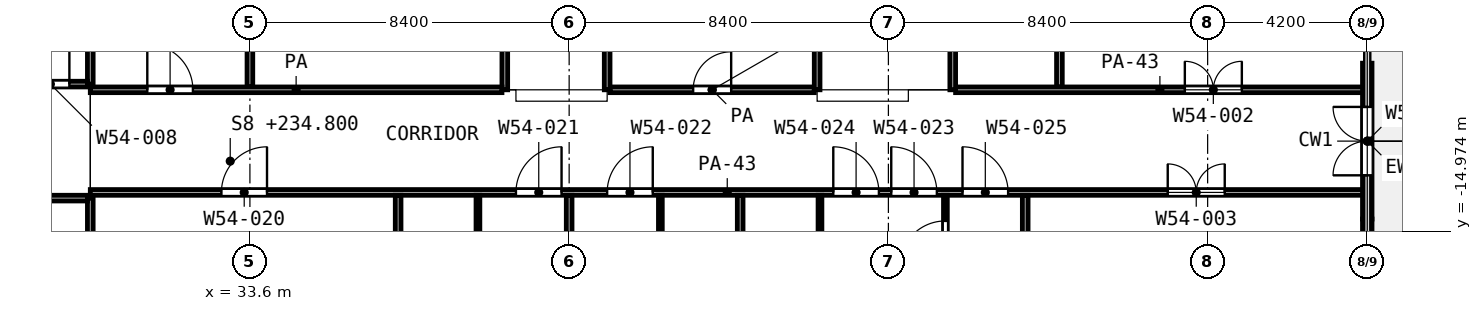
"""IFC4 building model, lengths in metres.
Left out: names, types, materials, properties, quantities, classifications, styles, units other than length and angle.
Written with IfcOpenShell. Run it as: python <this file> out.ifc"""

import sys

from ifc_helpers import new_model, si_unit, direction, frame, frame_2d, origin, place, context, subcontext, project, spatial, rectangle, extrude, element, fill, save


model = new_model("IFC4")
c1 = context("Model", 3, precision=1e-05, world=origin(), true_north=direction((0.0, 1.0)))
c2 = subcontext(c1, "Body", "Model", "MODEL_VIEW")
j1 = project(units=[si_unit("LENGTHUNIT", "METRE"), si_unit("PLANEANGLEUNIT", "RADIAN")], contexts=[c1])
p1 = place(None, origin())
s1 = spatial("IfcSite", under=j1, at=p1, CompositionType="ELEMENT")
p2 = place(p1, origin())
s2 = spatial("IfcBuilding", under=s1, at=p2, CompositionType="ELEMENT")
p3 = place(p2, frame((0.0, 0.0, 234.8)))
s3 = spatial("IfcBuildingStorey", under=s2, at=p3, CompositionType="ELEMENT", Elevation=234.8)
p4 = place(p3, frame((63.0, -18.75, 0.0), z_axis=(0.0, 0.0, 1.0), x_axis=(0.0, 1.0, 0.0)))
e1 = element("IfcWall", 1, at=p4, inside=s3, PredefinedType="SOLIDWALL", context=c2, shape_type="SweptSolid", body=[
    extrude(rectangle(XDim=4.1, YDim=0.25, at=frame_2d((2.05, 0.0))), origin(), (0.0, 0.0, 1.0), 2.58),
])
p5 = place(p4, frame((1.15, 0.0, 0.0)))
e2 = element("IfcOpeningElement", 2, at=p5, cuts=e1, PredefinedType="OPENING", context=c2, shape_type="SweptSolid", body=[
    extrude(rectangle(XDim=1.8, YDim=2.1, at=frame_2d((0.9, 1.05))), frame((0.0, 0.135, 0.0), z_axis=(0.0, -1.0, 0.0), x_axis=(1.0, 0.0, 0.0)), (0.0, 0.0, 1.0), 0.27),
])
p6 = place(p3, frame((63.0, -14.65, 0.0), z_axis=(0.0, 0.0, 1.0), x_axis=(0.0, 1.0, 0.0)))
e3 = element("IfcWall", 3, at=p6, inside=s3, PredefinedType="SOLIDWALL", context=c2, shape_type="SweptSolid", body=[
    extrude(rectangle(XDim=4.1, YDim=0.25, at=frame_2d((2.05, 0.0))), origin(), (0.0, 0.0, 1.0), 2.58),
])
p7 = place(p6, frame((1.15, 0.0, 0.0)))
e4 = element("IfcOpeningElement", 4, at=p7, cuts=e3, PredefinedType="OPENING", context=c2, shape_type="SweptSolid", body=[
    extrude(rectangle(XDim=1.8, YDim=2.1, at=frame_2d((0.9, 1.05))), frame((0.0, 0.135, 0.0), z_axis=(0.0, -1.0, 0.0), x_axis=(1.0, 0.0, 0.0)), (0.0, 0.0, 1.0), 0.27),
])
for number, where, z_axis, x_axis in (
    (5, (39.6, -16.65, 0.0), (0.0, 0.0, 1.0), (0.0, 1.0, 0.0)),
    (6, (44.4, -16.65, 0.0), (0.0, 0.0, 1.0), (0.0, 1.0, 0.0)),
    (7, (48.6, -16.65, 0.0), (0.0, 0.0, 1.0), (0.0, 1.0, 0.0)),
):
    element("IfcWall", number, at=place(p3, frame(where, z_axis=z_axis, x_axis=x_axis)), inside=s3, PredefinedType="PARTITIONING", context=c2, shape_type="SweptSolid", body=[
        extrude(rectangle(XDim=2.625, YDim=0.1, at=frame_2d((1.312, 0.0))), origin(), (0.0, 0.0, 1.0), 3.6),
    ])
p8 = place(p3, frame((51.9, -16.65, 0.0), z_axis=(0.0, 0.0, 1.0), x_axis=(0.0, 1.0, 0.0)))
e8 = element("IfcWall", 8, at=p8, inside=s3, PredefinedType="PARTITIONING", context=c2, shape_type="SweptSolid", body=[
    extrude(rectangle(XDim=2.625, YDim=0.1, at=frame_2d((1.312, 0.0))), origin(), (0.0, 0.0, 1.0), 3.6),
])
p9 = place(p8, frame((0.75, 0.0, 0.0)))
e9 = element("IfcOpeningElement", 9, at=p9, cuts=e8, PredefinedType="OPENING", context=c2, shape_type="SweptSolid", body=[
    extrude(rectangle(XDim=1.2, YDim=2.1, at=frame_2d((0.6, 1.05))), frame((0.0, 0.06, 0.0), z_axis=(0.0, -1.0, 0.0), x_axis=(1.0, 0.0, 0.0)), (0.0, 0.0, 1.0), 0.12),
])
p10 = place(p3, frame((24.8, -14.1, 0.0), z_axis=(0.0, 0.0, 1.0), x_axis=(1.0, 0.0, 0.0)))
e10 = element("IfcWall", 10, at=p10, inside=s3, PredefinedType="PARTITIONING", context=c2, shape_type="SweptSolid", body=[
    extrude(rectangle(XDim=4.525, YDim=0.15, at=frame_2d((2.262, 0.0))), origin(), (0.0, 0.0, 1.0), 3.6),
])
p11 = place(p10, frame((1.75, 0.0, 0.0)))
e11 = element("IfcOpeningElement", 11, at=p11, cuts=e10, PredefinedType="OPENING", context=c2, shape_type="SweptSolid", body=[
    extrude(rectangle(XDim=1.5, YDim=2.1, at=frame_2d((0.75, 1.05))), frame((0.0, 0.085, 0.0), z_axis=(0.0, -1.0, 0.0), x_axis=(1.0, 0.0, 0.0)), (0.0, 0.0, 1.0), 0.17),
])
p12 = place(p3, frame((29.4, -13.95, 0.0), z_axis=(0.0, 0.0, 1.0), x_axis=(1.0, 0.0, 0.0)))
e12 = element("IfcWall", 12, at=p12, inside=s3, PredefinedType="PARTITIONING", context=c2, shape_type="SweptSolid", body=[
    extrude(rectangle(XDim=33.52, YDim=0.15, at=frame_2d((16.76, 0.0))), origin(), (0.0, 0.0, 1.0), 2.7),
])
p13 = place(p12, frame((3.45, 0.0, 0.0)))
e13 = element("IfcOpeningElement", 13, at=p13, cuts=e12, PredefinedType="OPENING", context=c2, shape_type="SweptSolid", body=[
    extrude(rectangle(XDim=1.2, YDim=2.1, at=frame_2d((0.6, 1.05))), frame((0.0, 0.085, 0.0), z_axis=(0.0, -1.0, 0.0), x_axis=(1.0, 0.0, 0.0)), (0.0, 0.0, 1.0), 0.17),
])
p14 = place(p12, frame((11.2, 0.0, 0.0)))
e14 = element("IfcOpeningElement", 14, at=p14, cuts=e12, PredefinedType="OPENING", context=c2, shape_type="SweptSolid", body=[
    extrude(rectangle(XDim=1.2, YDim=2.1, at=frame_2d((0.6, 1.05))), frame((0.0, 0.085, 0.0), z_axis=(0.0, -1.0, 0.0), x_axis=(1.0, 0.0, 0.0)), (0.0, 0.0, 1.0), 0.17),
])
p15 = place(p12, frame((13.6, 0.0, 0.0)))
e15 = element("IfcOpeningElement", 15, at=p15, cuts=e12, PredefinedType="OPENING", context=c2, shape_type="SweptSolid", body=[
    extrude(rectangle(XDim=1.2, YDim=2.1, at=frame_2d((0.6, 1.05))), frame((0.0, 0.085, 0.0), z_axis=(0.0, -1.0, 0.0), x_axis=(1.0, 0.0, 0.0)), (0.0, 0.0, 1.0), 0.17),
])
p16 = place(p12, frame((21.075, 0.0, 0.0)))
e16 = element("IfcOpeningElement", 16, at=p16, cuts=e12, PredefinedType="OPENING", context=c2, shape_type="SweptSolid", body=[
    extrude(rectangle(XDim=1.2, YDim=2.1, at=frame_2d((0.6, 1.05))), frame((0.0, 0.085, 0.0), z_axis=(0.0, -1.0, 0.0), x_axis=(1.0, 0.0, 0.0)), (0.0, 0.0, 1.0), 0.17),
])
p17 = place(p12, frame((19.55, 0.0, 0.0)))
e17 = element("IfcOpeningElement", 17, at=p17, cuts=e12, PredefinedType="OPENING", context=c2, shape_type="SweptSolid", body=[
    extrude(rectangle(XDim=1.2, YDim=2.1, at=frame_2d((0.6, 1.05))), frame((0.0, 0.085, 0.0), z_axis=(0.0, -1.0, 0.0), x_axis=(1.0, 0.0, 0.0)), (0.0, 0.0, 1.0), 0.17),
])
p18 = place(p12, frame((22.95, 0.0, 0.0)))
e18 = element("IfcOpeningElement", 18, at=p18, cuts=e12, PredefinedType="OPENING", context=c2, shape_type="SweptSolid", body=[
    extrude(rectangle(XDim=1.2, YDim=2.1, at=frame_2d((0.6, 1.05))), frame((0.0, 0.085, 0.0), z_axis=(0.0, -1.0, 0.0), x_axis=(1.0, 0.0, 0.0)), (0.0, 0.0, 1.0), 0.17),
])
p19 = place(p12, frame((28.35, 0.0, 0.0)))
e19 = element("IfcOpeningElement", 19, at=p19, cuts=e12, PredefinedType="OPENING", context=c2, shape_type="SweptSolid", body=[
    extrude(rectangle(XDim=1.5, YDim=2.1, at=frame_2d((0.75, 1.05))), frame((0.0, 0.085, 0.0), z_axis=(0.0, -1.0, 0.0), x_axis=(1.0, 0.0, 0.0)), (0.0, 0.0, 1.0), 0.17),
])
p20 = place(p3, frame((29.4, -11.25, 0.0), z_axis=(0.0, 0.0, 1.0), x_axis=(1.0, 0.0, 0.0)))
e20 = element("IfcWall", 20, at=p20, inside=s3, PredefinedType="PARTITIONING", context=c2, shape_type="SweptSolid", body=[
    extrude(rectangle(XDim=10.832, YDim=0.15, at=frame_2d((5.416, 0.0))), origin(), (0.0, 0.0, 1.0), 3.6),
])
p21 = place(p20, frame((1.5, 0.0, 0.0)))
e21 = element("IfcOpeningElement", 21, at=p21, cuts=e20, PredefinedType="OPENING", context=c2, shape_type="SweptSolid", body=[
    extrude(rectangle(XDim=1.2, YDim=2.1, at=frame_2d((0.6, 1.05))), frame((0.0, 0.085, 0.0), z_axis=(0.0, -1.0, 0.0), x_axis=(1.0, 0.0, 0.0)), (0.0, 0.0, 1.0), 0.17),
])
p22 = place(p3, frame((43.075, -11.25, 0.0), z_axis=(0.0, 0.0, 1.0), x_axis=(1.0, 0.0, 0.0)))
e22 = element("IfcWall", 22, at=p22, inside=s3, PredefinedType="PARTITIONING", context=c2, shape_type="SweptSolid", body=[
    extrude(rectangle(XDim=5.375, YDim=0.15, at=frame_2d((2.688, 0.0))), origin(), (0.0, 0.0, 1.0), 3.6),
])
p23 = place(p22, frame((2.188, 0.0, 0.0)))
e23 = element("IfcOpeningElement", 23, at=p23, cuts=e22, PredefinedType="OPENING", context=c2, shape_type="SweptSolid", body=[
    extrude(rectangle(XDim=1.0, YDim=2.1, at=frame_2d((0.5, 1.05))), frame((0.0, 0.085, 0.0), z_axis=(0.0, -1.0, 0.0), x_axis=(1.0, 0.0, 0.0)), (0.0, 0.0, 1.0), 0.17),
])
p24 = place(p3, frame((52.168, -11.25, 0.0), z_axis=(0.0, 0.0, 1.0), x_axis=(1.0, 0.0, 0.0)))
e24 = element("IfcWall", 24, at=p24, inside=s3, PredefinedType="PARTITIONING", context=c2, shape_type="SweptSolid", body=[
    extrude(rectangle(XDim=10.752, YDim=0.15, at=frame_2d((5.376, 0.0))), origin(), (0.0, 0.0, 1.0), 2.7),
])
p25 = place(p24, frame((6.032, 0.0, 0.0)))
e25 = element("IfcOpeningElement", 25, at=p25, cuts=e24, PredefinedType="OPENING", context=c2, shape_type="SweptSolid", body=[
    extrude(rectangle(XDim=1.5, YDim=2.1, at=frame_2d((0.75, 1.05))), frame((0.0, 0.085, 0.0), z_axis=(0.0, -1.0, 0.0), x_axis=(1.0, 0.0, 0.0)), (0.0, 0.0, 1.0), 0.17),
])
p26 = place(p3, frame((24.8, -11.1, 0.0), z_axis=(0.0, 0.0, 1.0), x_axis=(1.0, 0.0, 0.0)))
e26 = element("IfcWall", 26, at=p26, inside=s3, PredefinedType="PARTITIONING", context=c2, shape_type="SweptSolid", body=[
    extrude(rectangle(XDim=4.525, YDim=0.15, at=frame_2d((2.262, 0.0))), origin(), (0.0, 0.0, 1.0), 3.6),
])
p27 = place(p26, frame((1.0, 0.0, 0.0)))
e27 = element("IfcOpeningElement", 27, at=p27, cuts=e26, PredefinedType="OPENING", context=c2, shape_type="SweptSolid", body=[
    extrude(rectangle(XDim=0.9, YDim=2.1, at=frame_2d((0.45, 1.05))), frame((0.0, 0.085, 0.0), z_axis=(0.0, -1.0, 0.0), x_axis=(1.0, 0.0, 0.0)), (0.0, 0.0, 1.0), 0.17),
])
p28 = place(p26, frame((3.05, 0.0, 0.0)))
e28 = element("IfcOpeningElement", 28, at=p28, cuts=e26, PredefinedType="OPENING", context=c2, shape_type="SweptSolid", body=[
    extrude(rectangle(XDim=1.0, YDim=2.1, at=frame_2d((0.5, 1.05))), frame((0.0, 0.085, 0.0), z_axis=(0.0, -1.0, 0.0), x_axis=(1.0, 0.0, 0.0)), (0.0, 0.0, 1.0), 0.17),
])
p29 = place(p3, frame((29.4, -25.2, 0.0), z_axis=(0.0, 0.0, 1.0), x_axis=(0.0, 1.0, 0.0)))
e29 = element("IfcWall", 29, at=p29, inside=s3, PredefinedType="PARTITIONING", context=c2, shape_type="SweptSolid", body=[
    extrude(rectangle(XDim=11.1, YDim=0.15, at=frame_2d((5.55, 0.0))), origin(), (0.0, 0.0, 1.0), 3.6),
])
p30 = place(p3, frame((29.4, -11.1, 0.0), z_axis=(0.0, 0.0, 1.0), x_axis=(0.0, 1.0, 0.0)))
e30 = element("IfcWall", 30, at=p30, inside=s3, PredefinedType="PARTITIONING", context=c2, shape_type="SweptSolid", body=[
    extrude(rectangle(XDim=11.02, YDim=0.15, at=frame_2d((5.51, 0.0))), origin(), (0.0, 0.0, 1.0), 3.6),
])
p31 = place(p3, frame((33.6, -11.175, 0.0), z_axis=(0.0, 0.0, 1.0), x_axis=(0.0, 1.0, 0.0)))
e31 = element("IfcWall", 31, at=p31, inside=s3, PredefinedType="PARTITIONING", context=c2, shape_type="SweptSolid", body=[
    extrude(rectangle(XDim=11.095, YDim=0.15, at=frame_2d((5.547, 0.0))), origin(), (0.0, 0.0, 1.0), 3.6),
])
p32 = place(p3, frame((37.5, -25.12, 0.0), z_axis=(0.0, 0.0, 1.0), x_axis=(0.0, 1.0, 0.0)))
e32 = element("IfcWall", 32, at=p32, inside=s3, PredefinedType="PARTITIONING", context=c2, shape_type="SweptSolid", body=[
    extrude(rectangle(XDim=11.095, YDim=0.15, at=frame_2d((5.548, 0.0))), origin(), (0.0, 0.0, 1.0), 3.6),
])
p33 = place(p3, frame((40.307, -11.25, 0.0), z_axis=(0.0, 0.0, 1.0), x_axis=(0.0, 1.0, 0.0)))
e33 = element("IfcWall", 33, at=p33, inside=s3, PredefinedType="PARTITIONING", context=c2, shape_type="SweptSolid", body=[
    extrude(rectangle(XDim=11.17, YDim=0.15, at=frame_2d((5.585, 0.0))), origin(), (0.0, 0.0, 1.0), 3.6),
])
p34 = place(p33, frame((4.95, 0.0, 0.0)))
e34 = element("IfcOpeningElement", 34, at=p34, cuts=e33, PredefinedType="OPENING", context=c2, shape_type="SweptSolid", body=[
    extrude(rectangle(XDim=1.0, YDim=2.1, at=frame_2d((0.5, 1.05))), frame((0.0, 0.085, 0.0), z_axis=(0.0, -1.0, 0.0), x_axis=(1.0, 0.0, 0.0)), (0.0, 0.0, 1.0), 0.17),
])
p35 = place(p3, frame((42.0, -25.12, 0.0), z_axis=(0.0, 0.0, 1.0), x_axis=(0.0, 1.0, 0.0)))
e35 = element("IfcWall", 35, at=p35, inside=s3, PredefinedType="PARTITIONING", context=c2, shape_type="SweptSolid", body=[
    extrude(rectangle(XDim=11.095, YDim=0.15, at=frame_2d((5.548, 0.0))), origin(), (0.0, 0.0, 1.0), 3.6),
])
p36 = place(p3, frame((43.0, -11.25, 0.0), z_axis=(0.0, 0.0, 1.0), x_axis=(0.0, 1.0, 0.0)))
e36 = element("IfcWall", 36, at=p36, inside=s3, PredefinedType="PARTITIONING", context=c2, shape_type="SweptSolid", body=[
    extrude(rectangle(XDim=2.398, YDim=0.15, at=frame_2d((1.199, 0.0))), origin(), (0.0, 0.0, 1.0), 3.6),
])
p37 = place(p3, frame((46.5, -25.12, 0.0), z_axis=(0.0, 0.0, 1.0), x_axis=(0.0, 1.0, 0.0)))
e37 = element("IfcWall", 37, at=p37, inside=s3, PredefinedType="PARTITIONING", context=c2, shape_type="SweptSolid", body=[
    extrude(rectangle(XDim=11.095, YDim=0.15, at=frame_2d((5.548, 0.0))), origin(), (0.0, 0.0, 1.0), 3.6),
])
p38 = place(p3, frame((48.525, -11.25, 0.0), z_axis=(0.0, 0.0, 1.0), x_axis=(0.0, 1.0, 0.0)))
e38 = element("IfcWall", 38, at=p38, inside=s3, PredefinedType="PARTITIONING", context=c2, shape_type="SweptSolid", body=[
    extrude(rectangle(XDim=2.6, YDim=0.15, at=frame_2d((1.3, 0.0))), origin(), (0.0, 0.0, 1.0), 3.6),
])
p39 = place(p3, frame((52.093, -11.25, 0.0), z_axis=(0.0, 0.0, 1.0), x_axis=(0.0, 1.0, 0.0)))
e39 = element("IfcWall", 39, at=p39, inside=s3, PredefinedType="PARTITIONING", context=c2, shape_type="SweptSolid", body=[
    extrude(rectangle(XDim=9.398, YDim=0.15, at=frame_2d((4.699, 0.0))), origin(), (0.0, 0.0, 1.0), 3.6),
])
p40 = place(p39, frame((4.199, 0.0, 0.0)))
e40 = element("IfcOpeningElement", 40, at=p40, cuts=e39, PredefinedType="OPENING", context=c2, shape_type="SweptSolid", body=[
    extrude(rectangle(XDim=1.0, YDim=2.1, at=frame_2d((0.5, 1.05))), frame((0.0, 0.085, 0.0), z_axis=(0.0, -1.0, 0.0), x_axis=(1.0, 0.0, 0.0)), (0.0, 0.0, 1.0), 0.17),
])
p41 = place(p3, frame((54.0, -25.12, 0.0), z_axis=(0.0, 0.0, 1.0), x_axis=(0.0, 1.0, 0.0)))
e41 = element("IfcWall", 41, at=p41, inside=s3, PredefinedType="PARTITIONING", context=c2, shape_type="SweptSolid", body=[
    extrude(rectangle(XDim=11.095, YDim=0.15, at=frame_2d((5.548, 0.0))), origin(), (0.0, 0.0, 1.0), 3.6),
])
p42 = place(p3, frame((54.9, -11.175, 0.0), z_axis=(0.0, 0.0, 1.0), x_axis=(0.0, 1.0, 0.0)))
e42 = element("IfcWall", 42, at=p42, inside=s3, PredefinedType="PARTITIONING", context=c2, shape_type="SweptSolid", body=[
    extrude(rectangle(XDim=11.095, YDim=0.15, at=frame_2d((5.547, 0.0))), origin(), (0.0, 0.0, 1.0), 3.6),
])
p43 = place(p7, origin())
e43 = element("IfcDoor", 43, at=p43, inside=s3, OperationType="DOUBLE_DOOR_SINGLE_SWING", PredefinedType="DOOR", context=c2, shape_type="SweptSolid", body=[
    extrude(rectangle(XDim=1.8, YDim=2.1, at=frame_2d((0.9, 1.05))), frame((0.0, 0.025, 0.0), z_axis=(0.0, -1.0, 0.0), x_axis=(1.0, 0.0, 0.0)), (0.0, 0.0, 1.0), 0.05),
])
fill(e4, e43)
p44 = place(p23, origin())
e44 = element("IfcDoor", 44, at=p44, inside=s3, OperationType="SINGLE_SWING_RIGHT", PredefinedType="DOOR", context=c2, shape_type="SweptSolid", body=[
    extrude(rectangle(XDim=1.0, YDim=2.1, at=frame_2d((0.5, 1.05))), frame((0.0, 0.025, 0.0), z_axis=(0.0, -1.0, 0.0), x_axis=(1.0, 0.0, 0.0)), (0.0, 0.0, 1.0), 0.05),
])
fill(e23, e44)
p45 = place(p25, origin())
e45 = element("IfcDoor", 45, at=p45, inside=s3, OperationType="DOUBLE_DOOR_SINGLE_SWING", PredefinedType="DOOR", context=c2, shape_type="SweptSolid", body=[
    extrude(rectangle(XDim=1.5, YDim=2.1, at=frame_2d((0.75, 1.05))), frame((0.0, 0.025, 0.0), z_axis=(0.0, -1.0, 0.0), x_axis=(1.0, 0.0, 0.0)), (0.0, 0.0, 1.0), 0.05),
])
fill(e25, e45)
p46 = place(p13, origin())
e46 = element("IfcDoor", 46, at=p46, inside=s3, OperationType="SINGLE_SWING_RIGHT", PredefinedType="DOOR", context=c2, shape_type="SweptSolid", body=[
    extrude(rectangle(XDim=1.2, YDim=2.1, at=frame_2d((0.6, 1.05))), frame((0.0, 0.025, 0.0), z_axis=(0.0, -1.0, 0.0), x_axis=(1.0, 0.0, 0.0)), (0.0, 0.0, 1.0), 0.05),
])
fill(e13, e46)
p47 = place(p14, origin())
e47 = element("IfcDoor", 47, at=p47, inside=s3, OperationType="SINGLE_SWING_RIGHT", PredefinedType="DOOR", context=c2, shape_type="SweptSolid", body=[
    extrude(rectangle(XDim=1.2, YDim=2.1, at=frame_2d((0.6, 1.05))), frame((0.0, 0.025, 0.0), z_axis=(0.0, -1.0, 0.0), x_axis=(1.0, 0.0, 0.0)), (0.0, 0.0, 1.0), 0.05),
])
fill(e14, e47)
p48 = place(p15, origin())
e48 = element("IfcDoor", 48, at=p48, inside=s3, OperationType="SINGLE_SWING_RIGHT", PredefinedType="DOOR", context=c2, shape_type="SweptSolid", body=[
    extrude(rectangle(XDim=1.2, YDim=2.1, at=frame_2d((0.6, 1.05))), frame((0.0, 0.025, 0.0), z_axis=(0.0, -1.0, 0.0), x_axis=(1.0, 0.0, 0.0)), (0.0, 0.0, 1.0), 0.05),
])
fill(e15, e48)
p49 = place(p16, origin())
e49 = element("IfcDoor", 49, at=p49, inside=s3, OperationType="SINGLE_SWING_LEFT", PredefinedType="DOOR", context=c2, shape_type="SweptSolid", body=[
    extrude(rectangle(XDim=1.2, YDim=2.1, at=frame_2d((0.6, 1.05))), frame((0.0, 0.025, 0.0), z_axis=(0.0, -1.0, 0.0), x_axis=(1.0, 0.0, 0.0)), (0.0, 0.0, 1.0), 0.05),
])
fill(e16, e49)
p50 = place(p17, origin())
e50 = element("IfcDoor", 50, at=p50, inside=s3, OperationType="SINGLE_SWING_LEFT", PredefinedType="DOOR", context=c2, shape_type="SweptSolid", body=[
    extrude(rectangle(XDim=1.2, YDim=2.1, at=frame_2d((0.6, 1.05))), frame((0.0, 0.025, 0.0), z_axis=(0.0, -1.0, 0.0), x_axis=(1.0, 0.0, 0.0)), (0.0, 0.0, 1.0), 0.05),
])
fill(e17, e50)
p51 = place(p18, origin())
e51 = element("IfcDoor", 51, at=p51, inside=s3, OperationType="SINGLE_SWING_LEFT", PredefinedType="DOOR", context=c2, shape_type="SweptSolid", body=[
    extrude(rectangle(XDim=1.2, YDim=2.1, at=frame_2d((0.6, 1.05))), frame((0.0, 0.025, 0.0), z_axis=(0.0, -1.0, 0.0), x_axis=(1.0, 0.0, 0.0)), (0.0, 0.0, 1.0), 0.05),
])
fill(e18, e51)
p52 = place(p9, origin())
e52 = element("IfcDoor", 52, at=p52, inside=s3, OperationType="SINGLE_SWING_LEFT", PredefinedType="DOOR", context=c2, shape_type="SweptSolid", body=[
    extrude(rectangle(XDim=1.2, YDim=2.1, at=frame_2d((0.6, 1.05))), frame((0.0, 0.025, 0.0), z_axis=(0.0, -1.0, 0.0), x_axis=(1.0, 0.0, 0.0)), (0.0, 0.0, 1.0), 0.05),
])
fill(e9, e52)
p53 = place(p19, origin())
e53 = element("IfcDoor", 53, at=p53, inside=s3, OperationType="DOUBLE_DOOR_SINGLE_SWING", PredefinedType="DOOR", context=c2, shape_type="SweptSolid", body=[
    extrude(rectangle(XDim=1.5, YDim=2.1, at=frame_2d((0.75, 1.05))), frame((0.0, 0.025, 0.0), z_axis=(0.0, -1.0, 0.0), x_axis=(1.0, 0.0, 0.0)), (0.0, 0.0, 1.0), 0.05),
])
fill(e19, e53)
p54 = place(p28, origin())
e54 = element("IfcDoor", 54, at=p54, inside=s3, OperationType="SINGLE_SWING_RIGHT", PredefinedType="DOOR", context=c2, shape_type="SweptSolid", body=[
    extrude(rectangle(XDim=1.0, YDim=2.1, at=frame_2d((0.5, 1.05))), frame((0.0, 0.025, 0.0), z_axis=(0.0, -1.0, 0.0), x_axis=(1.0, 0.0, 0.0)), (0.0, 0.0, 1.0), 0.05),
])
fill(e28, e54)
p55 = place(p21, origin())
e55 = element("IfcDoor", 55, at=p55, inside=s3, OperationType="SINGLE_SWING_LEFT", PredefinedType="DOOR", context=c2, shape_type="SweptSolid", body=[
    extrude(rectangle(XDim=1.2, YDim=2.1, at=frame_2d((0.6, 1.05))), frame((0.0, 0.025, 0.0), z_axis=(0.0, -1.0, 0.0), x_axis=(1.0, 0.0, 0.0)), (0.0, 0.0, 1.0), 0.05),
])
fill(e21, e55)
save(model, sys.argv[1])
